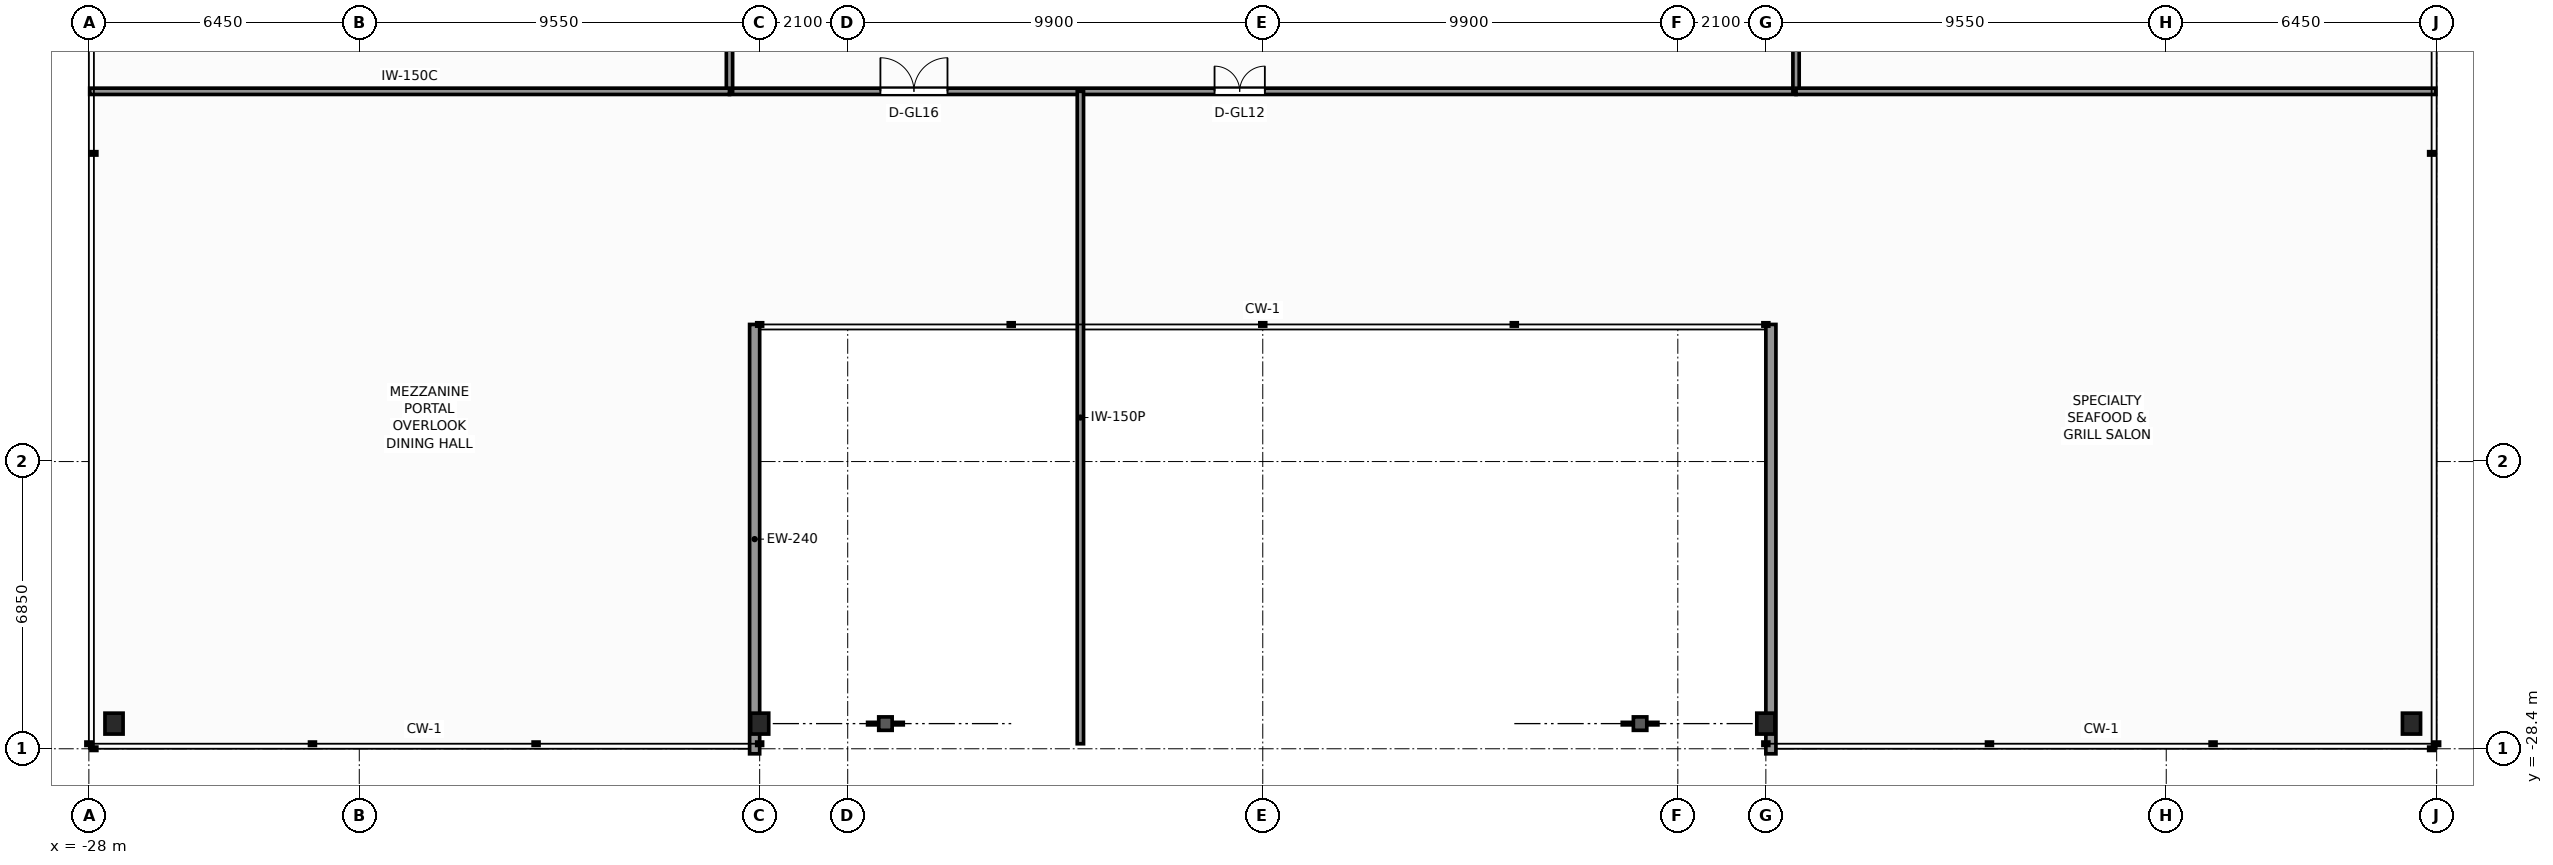
"""IFC4 building model, lengths in metres.
Left out: names, types, materials, properties, quantities, classifications, styles, units other than length and angle.
Written with IfcOpenShell. Run it as: python <this file> out.ifc"""

import sys

from ifc_helpers import new_model, si_unit, direction, frame, frame_2d, origin, origin_2d, place, context, subcontext, project, spatial, rectangle, i_section, extrude, element, fill, save


model = new_model("IFC4")
c1 = context("Model", 3, precision=1e-05, world=origin(), true_north=direction((0.0, 1.0)))
c2 = subcontext(c1, "Body", "Model", "MODEL_VIEW")
j1 = project(units=[si_unit("LENGTHUNIT", "METRE"), si_unit("PLANEANGLEUNIT", "RADIAN")], contexts=[c1])
p1 = place(None, origin())
s1 = spatial("IfcSite", under=j1, at=p1, CompositionType="ELEMENT")
p2 = place(p1, origin())
s2 = spatial("IfcBuilding", under=s1, at=p2, CompositionType="ELEMENT")
p3 = place(p2, frame((0.0, 0.0, 5.5)))
s3 = spatial("IfcBuildingStorey", under=s2, at=p3, CompositionType="ELEMENT", Elevation=5.5)
for number, where, z_axis, x_axis in (
    (1, (-27.4, -27.8, 0.0), (0.0, 0.0, 1.0), (1.0, 0.0, 0.0)),
    (2, (-12.0, -27.8, 0.0), (0.0, 0.0, 1.0), (1.0, 0.0, 0.0)),
    (3, (12.0, -27.8, 0.0), (0.0, 0.0, 1.0), (1.0, 0.0, 0.0)),
    (4, (27.4, -27.8, 0.0), (0.0, 0.0, 1.0), (1.0, 0.0, 0.0)),
):
    element("IfcColumn", number, at=place(p3, frame(where, z_axis=z_axis, x_axis=x_axis)), inside=s3, PredefinedType="COLUMN", context=c2, shape_type="SweptSolid", body=[
        extrude(i_section(OverallWidth=0.432, OverallDepth=0.498, WebThickness=0.056, FlangeThickness=0.089, FilletRadius=0.025, at=origin_2d()), origin(), (0.0, 0.0, 1.0), 4.5),
    ])
for number, where, z_axis, x_axis in (
    (5, (-12.12, -18.28, 0.0), (0.0, 0.0, 1.0), (0.0, -1.0, 0.0)),
    (6, (12.12, -28.52, 0.0), (0.0, 0.0, 1.0), (0.0, 1.0, 0.0)),
):
    element("IfcWall", number, at=place(p3, frame(where, z_axis=z_axis, x_axis=x_axis)), inside=s3, PredefinedType="STANDARD", context=c2, shape_type="SweptSolid", body=[
        extrude(rectangle(XDim=10.24, YDim=0.24, at=frame_2d((5.12, 0.0))), origin(), (0.0, 0.0, 1.0), 3.204),
    ])
p4 = place(p3, frame((-12.72, -12.72, 0.0), z_axis=(0.0, 0.0, 1.0), x_axis=(1.0, 0.0, 0.0)))
e7 = element("IfcWall", 7, at=p4, inside=s3, PredefinedType="PARTITIONING", context=c2, shape_type="SweptSolid", body=[
    extrude(rectangle(XDim=25.44, YDim=0.15, at=frame_2d((12.72, 0.0))), origin(), (0.0, 0.0, 1.0), 3.194),
])
p5 = place(p4, frame((3.6, 0.0, 0.0)))
e8 = element("IfcOpeningElement", 8, at=p5, cuts=e7, PredefinedType="OPENING", context=c2, shape_type="SweptSolid", body=[
    extrude(rectangle(XDim=1.6, YDim=2.3, at=frame_2d((0.8, 1.15))), frame((0.0, 0.085, 0.0), z_axis=(0.0, -1.0, 0.0), x_axis=(1.0, 0.0, 0.0)), (0.0, 0.0, 1.0), 0.17),
])
p6 = place(p4, frame((11.57, 0.0, 0.0)))
e9 = element("IfcOpeningElement", 9, at=p6, cuts=e7, PredefinedType="OPENING", context=c2, shape_type="SweptSolid", body=[
    extrude(rectangle(XDim=1.2, YDim=2.2, at=frame_2d((0.6, 1.1))), frame((0.0, 0.085, 0.0), z_axis=(0.0, -1.0, 0.0), x_axis=(1.0, 0.0, 0.0)), (0.0, 0.0, 1.0), 0.17),
])
p7 = place(p3, frame((-12.72, -12.72, 0.0), z_axis=(0.0, 0.0, 1.0), x_axis=(0.0, 1.0, 0.0)))
e10 = element("IfcWall", 10, at=p7, inside=s3, PredefinedType="PARTITIONING", context=c2, shape_type="SweptSolid", body=[
    extrude(rectangle(XDim=12.42, YDim=0.15, at=frame_2d((6.21, 0.0))), origin(), (0.0, 0.0, 1.0), 3.194),
])
p8 = place(p7, frame((3.4, 0.0, 0.0)))
e11 = element("IfcOpeningElement", 11, at=p8, cuts=e10, PredefinedType="OPENING", context=c2, shape_type="SweptSolid", body=[
    extrude(rectangle(XDim=1.2, YDim=2.2, at=frame_2d((0.6, 1.1))), frame((0.0, 0.085, 0.0), z_axis=(0.0, -1.0, 0.0), x_axis=(1.0, 0.0, 0.0)), (0.0, 0.0, 1.0), 0.17),
])
p9 = place(p3, frame((12.72, -12.72, 0.0), z_axis=(0.0, 0.0, 1.0), x_axis=(0.0, 1.0, 0.0)))
e12 = element("IfcWall", 12, at=p9, inside=s3, PredefinedType="PARTITIONING", context=c2, shape_type="SweptSolid", body=[
    extrude(rectangle(XDim=12.42, YDim=0.15, at=frame_2d((6.21, 0.0))), origin(), (0.0, 0.0, 1.0), 3.194),
])
p10 = place(p9, frame((3.4, 0.0, 0.0)))
e13 = element("IfcOpeningElement", 13, at=p10, cuts=e12, PredefinedType="OPENING", context=c2, shape_type="SweptSolid", body=[
    extrude(rectangle(XDim=0.95, YDim=2.06, at=frame_2d((0.475, 1.03))), frame((0.0, 0.085, 0.0), z_axis=(0.0, -1.0, 0.0), x_axis=(1.0, 0.0, 0.0)), (0.0, 0.0, 1.0), 0.17),
])
for number, where, z_axis, x_axis in (
    (14, (-27.98, -12.72, 0.0), (0.0, 0.0, 1.0), (1.0, 0.0, 0.0)),
    (15, (12.72, -12.72, 0.0), (0.0, 0.0, 1.0), (1.0, 0.0, 0.0)),
):
    element("IfcWall", number, at=place(p3, frame(where, z_axis=z_axis, x_axis=x_axis)), inside=s3, PredefinedType="PARTITIONING", context=c2, shape_type="SweptSolid", body=[
        extrude(rectangle(XDim=15.26, YDim=0.15, at=frame_2d((7.63, 0.0))), origin(), (0.0, 0.0, 1.0), 3.589),
    ])
p11 = place(p3, frame((-4.35, -28.28, 0.0), z_axis=(0.0, 0.0, 1.0), x_axis=(0.0, 1.0, 0.0)))
e16 = element("IfcWall", 16, at=p11, inside=s3, PredefinedType="PARTITIONING", context=c2, shape_type="SweptSolid", body=[
    extrude(rectangle(XDim=15.56, YDim=0.15, at=frame_2d((7.78, 0.0))), origin(), (0.0, 0.0, 1.0), 4.22),
])
p12 = place(p5, origin())
e17 = element("IfcDoor", 17, at=p12, inside=s3, OperationType="DOUBLE_DOOR_SINGLE_SWING", PredefinedType="DOOR", context=c2, shape_type="SweptSolid", body=[
    extrude(rectangle(XDim=1.6, YDim=2.3, at=frame_2d((0.8, 1.15))), frame((0.0, 0.025, 0.0), z_axis=(0.0, -1.0, 0.0), x_axis=(1.0, 0.0, 0.0)), (0.0, 0.0, 1.0), 0.05),
])
fill(e8, e17)
p13 = place(p6, origin())
e18 = element("IfcDoor", 18, at=p13, inside=s3, OperationType="DOUBLE_DOOR_SINGLE_SWING", PredefinedType="DOOR", context=c2, shape_type="SweptSolid", body=[
    extrude(rectangle(XDim=1.2, YDim=2.2, at=frame_2d((0.6, 1.1))), frame((0.0, 0.025, 0.0), z_axis=(0.0, -1.0, 0.0), x_axis=(1.0, 0.0, 0.0)), (0.0, 0.0, 1.0), 0.05),
])
fill(e9, e18)
save(model, sys.argv[1])
